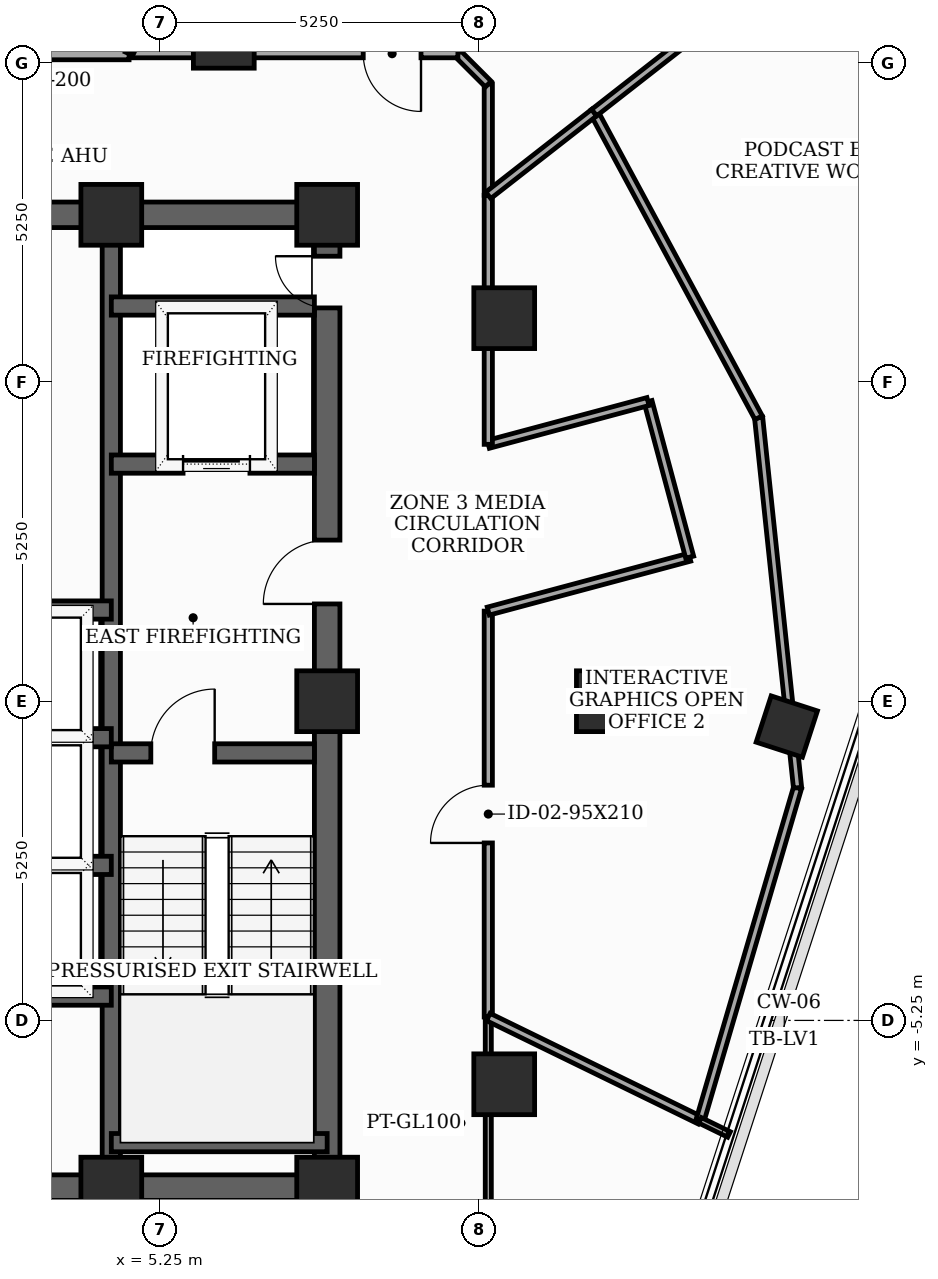
"""IFC4 building model, lengths in metres.
Left out: names, types, materials, properties, quantities, classifications, styles, units other than length and angle.
Written with IfcOpenShell. Run it as: python <this file> out.ifc"""

import sys

from ifc_helpers import new_model, si_unit, direction, frame, frame_2d, origin, origin_2d, place, context, subcontext, project, spatial, rectangle, extrude, element, fill, save


model = new_model("IFC4")
c1 = context("Model", 3, precision=1e-05, world=origin(), true_north=direction((0.0, 1.0)))
c2 = subcontext(c1, "Body", "Model", "MODEL_VIEW")
j1 = project(units=[si_unit("LENGTHUNIT", "METRE"), si_unit("PLANEANGLEUNIT", "RADIAN")], contexts=[c1])
p1 = place(None, origin())
s1 = spatial("IfcSite", under=j1, at=p1, CompositionType="ELEMENT")
p2 = place(p1, origin())
s2 = spatial("IfcBuilding", under=s1, at=p2, CompositionType="ELEMENT")
p3 = place(p2, frame((0.0, 0.0, 294.3)))
s3 = spatial("IfcBuildingStorey", under=s2, at=p3, CompositionType="ELEMENT", Elevation=294.3)
for number, where, z_axis, x_axis in (
    (1, (4.45, -8.0, 0.0), (0.0, 0.0, 1.0), (1.0, 0.0, 0.0)),
    (2, (8.0, -8.0, 0.0), (0.0, 0.0, 1.0), (1.0, 0.0, 0.0)),
    (3, (8.0, 0.0, 0.0), (0.0, 0.0, 1.0), (1.0, 0.0, 0.0)),
    (4, (8.0, 8.0, 0.0), (0.0, 0.0, 1.0), (1.0, 0.0, 0.0)),
    (5, (4.45, 8.0, 0.0), (0.0, 0.0, 1.0), (1.0, 0.0, 0.0)),
    (6, (12.6, 0.0, 0.0), (0.0, 0.0, 1.0), (1.0, 0.0, 0.0)),
    (7, (10.912, 6.3, 0.0), (0.0, 0.0, 1.0), (1.0, 0.0, 0.0)),
    (8, (6.3, 10.912, 0.0), (0.0, 0.0, 1.0), (1.0, 0.0, 0.0)),
    (9, (10.912, -6.3, 0.0), (0.0, 0.0, 1.0), (1.0, 0.0, 0.0)),
):
    element("IfcColumn", number, at=place(p3, frame(where, z_axis=z_axis, x_axis=x_axis)), inside=s3, PredefinedType="COLUMN", context=c2, shape_type="SweptSolid", body=[
        extrude(rectangle(XDim=1.0, YDim=1.0, at=origin_2d()), origin(), (0.0, 0.0, 1.0), 3.7),
    ])
p4 = place(p3, frame((15.559, -0.417, 0.0), z_axis=(0.0, 0.0, 1.0), x_axis=(0.309016994375, 0.951056516295, 0.0)))
e10 = element("IfcColumn", 10, at=p4, inside=s3, PredefinedType="COLUMN", context=c2, shape_type="SweptSolid", body=[
    extrude(rectangle(XDim=0.8, YDim=0.8, at=origin_2d()), origin(), (0.0, 0.0, 1.0), 3.7),
])
p5 = place(p3, frame((8.0, -8.0, 0.0), z_axis=(0.0, 0.0, 1.0), x_axis=(0.0, 1.0, 0.0)))
e11 = element("IfcWall", 11, at=p5, inside=s3, PredefinedType="SHEAR", context=c2, shape_type="SweptSolid", body=[
    extrude(rectangle(XDim=16.0, YDim=0.42, at=frame_2d((8.0, 0.0))), origin(), (0.0, 0.0, 1.0), 3.5),
])
p6 = place(p5, frame((9.6, 0.0, 0.0)))
e12 = element("IfcOpeningElement", 12, at=p6, cuts=e11, PredefinedType="OPENING", context=c2, shape_type="SweptSolid", body=[
    extrude(rectangle(XDim=1.05, YDim=2.15, at=frame_2d((0.525, 1.075))), frame((0.0, 0.22, 0.0), z_axis=(0.0, -1.0, 0.0), x_axis=(1.0, 0.0, 0.0)), (0.0, 0.0, 1.0), 0.44),
])
p7 = place(p5, frame((14.469, 0.0, 0.0)))
e13 = element("IfcOpeningElement", 13, at=p7, cuts=e11, PredefinedType="OPENING", context=c2, shape_type="SweptSolid", body=[
    extrude(rectangle(XDim=0.85, YDim=2.02, at=frame_2d((0.425, 1.01))), frame((0.0, 0.22, 0.0), z_axis=(0.0, -1.0, 0.0), x_axis=(1.0, 0.0, 0.0)), (0.0, 0.0, 1.0), 0.44),
])
p8 = place(p3, frame((-8.0, -8.0, 0.0), z_axis=(0.0, 0.0, 1.0), x_axis=(1.0, 0.0, 0.0)))
e14 = element("IfcWall", 14, at=p8, inside=s3, PredefinedType="SHEAR", context=c2, shape_type="SweptSolid", body=[
    extrude(rectangle(XDim=16.0, YDim=0.42, at=frame_2d((8.0, 0.0))), origin(), (0.0, 0.0, 1.0), 3.5),
])
p9 = place(p8, frame((5.2, 0.0, 0.0)))
e15 = element("IfcOpeningElement", 15, at=p9, cuts=e14, PredefinedType="OPENING", context=c2, shape_type="SweptSolid", body=[
    extrude(rectangle(XDim=0.95, YDim=2.1, at=frame_2d((0.475, 1.05))), frame((0.0, 0.22, 0.0), z_axis=(0.0, -1.0, 0.0), x_axis=(1.0, 0.0, 0.0)), (0.0, 0.0, 1.0), 0.44),
])
p10 = place(p8, frame((9.8, 0.0, 0.0)))
e16 = element("IfcOpeningElement", 16, at=p10, cuts=e14, PredefinedType="OPENING", context=c2, shape_type="SweptSolid", body=[
    extrude(rectangle(XDim=0.95, YDim=2.1, at=frame_2d((0.475, 1.05))), frame((0.0, 0.22, 0.0), z_axis=(0.0, -1.0, 0.0), x_axis=(1.0, 0.0, 0.0)), (0.0, 0.0, 1.0), 0.44),
])
p11 = place(p3, frame((-8.0, 8.0, 0.0), z_axis=(0.0, 0.0, 1.0), x_axis=(1.0, 0.0, 0.0)))
e17 = element("IfcWall", 17, at=p11, inside=s3, PredefinedType="SHEAR", context=c2, shape_type="SweptSolid", body=[
    extrude(rectangle(XDim=16.0, YDim=0.42, at=frame_2d((8.0, 0.0))), origin(), (0.0, 0.0, 1.0), 3.5),
])
p12 = place(p11, frame((7.1, 0.0, 0.0)))
e18 = element("IfcOpeningElement", 18, at=p12, cuts=e17, PredefinedType="OPENING", context=c2, shape_type="SweptSolid", body=[
    extrude(rectangle(XDim=1.8, YDim=2.15, at=frame_2d((0.9, 1.075))), frame((0.0, 0.22, 0.0), z_axis=(0.0, -1.0, 0.0), x_axis=(1.0, 0.0, 0.0)), (0.0, 0.0, 1.0), 0.44),
])
p13 = place(p3, frame((4.45, -7.79, 0.0), z_axis=(0.0, 0.0, 1.0), x_axis=(0.0, 1.0, 0.0)))
e19 = element("IfcWall", 19, at=p13, inside=s3, PredefinedType="SHEAR", context=c2, shape_type="SweptSolid", body=[
    extrude(rectangle(XDim=15.58, YDim=0.3, at=frame_2d((7.79, 0.0))), origin(), (0.0, 0.0, 1.0), 3.5),
])
p14 = place(p3, frame((4.45, -0.85, 0.0), z_axis=(0.0, 0.0, 1.0), x_axis=(1.0, 0.0, 0.0)))
e20 = element("IfcWall", 20, at=p14, inside=s3, PredefinedType="SHEAR", context=c2, shape_type="SweptSolid", body=[
    extrude(rectangle(XDim=3.34, YDim=0.3, at=frame_2d((1.67, 0.0))), origin(), (0.0, 0.0, 1.0), 3.5),
])
p15 = place(p14, frame((0.65, 0.0, 0.0)))
e21 = element("IfcOpeningElement", 21, at=p15, cuts=e20, PredefinedType="OPENING", context=c2, shape_type="SweptSolid", body=[
    extrude(rectangle(XDim=1.05, YDim=2.15, at=frame_2d((0.525, 1.075))), frame((0.0, 0.16, 0.0), z_axis=(0.0, -1.0, 0.0), x_axis=(1.0, 0.0, 0.0)), (0.0, 0.0, 1.0), 0.32),
])
p16 = place(p3, frame((4.45, -7.26, 0.0), z_axis=(0.0, 0.0, 1.0), x_axis=(1.0, 0.0, 0.0)))
e22 = element("IfcWall", 22, at=p16, inside=s3, PredefinedType="SHEAR", context=c2, shape_type="SweptSolid", body=[
    extrude(rectangle(XDim=3.55, YDim=0.3, at=frame_2d((1.775, 0.0))), origin(), (0.0, 0.0, 1.0), 3.5),
])
p17 = place(p3, frame((4.45, 3.9, 0.0), z_axis=(0.0, 0.0, 1.0), x_axis=(1.0, 0.0, 0.0)))
e23 = element("IfcWall", 23, at=p17, inside=s3, PredefinedType="SHEAR", context=c2, shape_type="SweptSolid", body=[
    extrude(rectangle(XDim=3.34, YDim=0.3, at=frame_2d((1.67, 0.0))), origin(), (0.0, 0.0, 1.0), 3.5),
])
p18 = place(p17, frame((1.18, 0.0, 0.0)))
e24 = element("IfcOpeningElement", 24, at=p18, cuts=e23, PredefinedType="OPENING", context=c2, shape_type="SweptSolid", body=[
    extrude(rectangle(XDim=1.1, YDim=2.1, at=frame_2d((0.55, 1.05))), frame((0.0, 0.16, 0.0), z_axis=(0.0, -1.0, 0.0), x_axis=(1.0, 0.0, 0.0)), (0.0, 0.0, 1.0), 0.32),
])
p19 = place(p3, frame((4.45, 6.5, 0.0), z_axis=(0.0, 0.0, 1.0), x_axis=(1.0, 0.0, 0.0)))
e25 = element("IfcWall", 25, at=p19, inside=s3, PredefinedType="SHEAR", context=c2, shape_type="SweptSolid", body=[
    extrude(rectangle(XDim=3.34, YDim=0.3, at=frame_2d((1.67, 0.0))), origin(), (0.0, 0.0, 1.0), 3.5),
])
p20 = place(p3, frame((-4.45, -4.85, 0.0), z_axis=(0.0, 0.0, 1.0), x_axis=(1.0, 0.0, 0.0)))
e26 = element("IfcWall", 26, at=p20, inside=s3, PredefinedType="SHEAR", context=c2, shape_type="SweptSolid", body=[
    extrude(rectangle(XDim=8.9, YDim=0.3, at=frame_2d((4.45, 0.0))), origin(), (0.0, 0.0, 1.0), 3.5),
])
for number, where, z_axis, x_axis in (
    (27, (1.68, 1.5, 0.0), (0.0, 0.0, 1.0), (1.0, 0.0, 0.0)),
    (28, (1.68, -2.7, 0.0), (0.0, 0.0, 1.0), (1.0, 0.0, 0.0)),
    (29, (1.68, -0.6, 0.0), (0.0, 0.0, 1.0), (1.0, 0.0, 0.0)),
):
    element("IfcWall", number, at=place(p3, frame(where, z_axis=z_axis, x_axis=x_axis)), inside=s3, PredefinedType="SHEAR", context=c2, shape_type="SweptSolid", body=[
        extrude(rectangle(XDim=2.77, YDim=0.3, at=frame_2d((1.385, 0.0))), origin(), (0.0, 0.0, 1.0), 3.5),
    ])
p21 = place(p3, frame((10.65, -5.194, 0.0), z_axis=(0.0, 0.0, 1.0), x_axis=(0.0, 1.0, 0.0)))
e30 = element("IfcWall", 30, at=p21, inside=s3, PredefinedType="PARTITIONING", context=c2, shape_type="SweptSolid", body=[
    extrude(rectangle(XDim=6.676, YDim=0.135, at=frame_2d((3.338, 0.0))), origin(), (0.0, 0.0, 1.0), 2.885),
])
p22 = place(p21, frame((2.863, 0.0, 0.0)))
e31 = element("IfcOpeningElement", 31, at=p22, cuts=e30, PredefinedType="OPENING", context=c2, shape_type="SweptSolid", body=[
    extrude(rectangle(XDim=0.95, YDim=2.1, at=frame_2d((0.475, 1.05))), frame((0.0, 0.077, 0.0), z_axis=(0.0, -1.0, 0.0), x_axis=(1.0, 0.0, 0.0)), (0.0, 0.0, 1.0), 0.155),
])
p23 = place(p3, frame((10.65, 1.482, 0.0), z_axis=(0.0, 0.0, 1.0), x_axis=(0.965961397105, 0.2586862565, 0.0)))
e32 = element("IfcWall", 32, at=p23, inside=s3, PredefinedType="PARTITIONING", context=c2, shape_type="SweptSolid", body=[
    extrude(rectangle(XDim=3.429, YDim=0.135, at=frame_2d((1.714, 0.0))), origin(), (0.0, 0.0, 1.0), 2.885),
])
p24 = place(p3, frame((13.962, 2.369, 0.0), z_axis=(0.0, 0.0, 1.0), x_axis=(-0.258413725385, 0.966034340245, 0.0)))
e33 = element("IfcWall", 33, at=p24, inside=s3, PredefinedType="PARTITIONING", context=c2, shape_type="SweptSolid", body=[
    extrude(rectangle(XDim=2.65, YDim=0.135, at=frame_2d((1.325, 0.0))), origin(), (0.0, 0.0, 1.0), 3.5),
])
p25 = place(p3, frame((13.277, 4.929, 0.0), z_axis=(0.0, 0.0, 1.0), x_axis=(-0.965934830229, -0.258785439601, 0.0)))
e34 = element("IfcWall", 34, at=p25, inside=s3, PredefinedType="PARTITIONING", context=c2, shape_type="SweptSolid", body=[
    extrude(rectangle(XDim=2.72, YDim=0.135, at=frame_2d((1.36, 0.0))), origin(), (0.0, 0.0, 1.0), 2.885),
])
p26 = place(p3, frame((10.65, 4.225, 0.0), z_axis=(0.0, 0.0, 1.0), x_axis=(0.0, 1.0, 0.0)))
e35 = element("IfcWall", 35, at=p26, inside=s3, PredefinedType="PARTITIONING", context=c2, shape_type="SweptSolid", body=[
    extrude(rectangle(XDim=4.096, YDim=0.135, at=frame_2d((2.048, 0.0))), origin(), (0.0, 0.0, 1.0), 2.885),
])
p27 = place(p3, frame((10.65, -10.15, 0.0), z_axis=(0.0, 0.0, 1.0), x_axis=(0.0, 1.0, 0.0)))
e36 = element("IfcWall", 36, at=p27, inside=s3, PredefinedType="MOVABLE", context=c2, shape_type="SweptSolid", body=[
    extrude(rectangle(XDim=4.956, YDim=0.1, at=frame_2d((2.478, 0.0))), origin(), (0.0, 0.0, 1.0), 2.885),
])
p28 = place(p27, frame((0.516, 0.0, 0.0)))
e37 = element("IfcOpeningElement", 37, at=p28, cuts=e36, PredefinedType="OPENING", context=c2, shape_type="SweptSolid", body=[
    extrude(rectangle(XDim=0.95, YDim=2.1, at=frame_2d((0.475, 1.05))), frame((0.0, 0.06, 0.0), z_axis=(0.0, -1.0, 0.0), x_axis=(1.0, 0.0, 0.0)), (0.0, 0.0, 1.0), 0.12),
])
p29 = place(p3, frame((10.65, 8.321, 0.0), z_axis=(0.0, 0.0, 1.0), x_axis=(0.0, 1.0, 0.0)))
e38 = element("IfcWall", 38, at=p29, inside=s3, PredefinedType="PARTITIONING", context=c2, shape_type="SweptSolid", body=[
    extrude(rectangle(XDim=1.829, YDim=0.135, at=frame_2d((0.915, 0.0))), origin(), (0.0, 0.0, 1.0), 3.5),
])
p30 = place(p3, frame((10.65, 10.15, 0.0), z_axis=(0.0, 0.0, 1.0), x_axis=(-0.707106781187, 0.707106781187, 0.0)))
e39 = element("IfcWall", 39, at=p30, inside=s3, PredefinedType="PARTITIONING", context=c2, shape_type="SweptSolid", body=[
    extrude(rectangle(XDim=0.707, YDim=0.135, at=frame_2d((0.354, 0.0))), origin(), (0.0, 0.0, 1.0), 3.5),
])
p31 = place(p3, frame((10.15, 10.65, 0.0), z_axis=(0.0, 0.0, 1.0), x_axis=(-1.0, 0.0, 0.0)))
e40 = element("IfcWall", 40, at=p31, inside=s3, PredefinedType="PARTITIONING", context=c2, shape_type="SweptSolid", body=[
    extrude(rectangle(XDim=5.408, YDim=0.135, at=frame_2d((2.704, 0.0))), origin(), (0.0, 0.0, 1.0), 2.885),
])
p32 = place(p31, frame((0.607, 0.0, 0.0)))
e41 = element("IfcOpeningElement", 41, at=p32, cuts=e40, PredefinedType="OPENING", context=c2, shape_type="SweptSolid", body=[
    extrude(rectangle(XDim=0.95, YDim=2.1, at=frame_2d((0.475, 1.05))), frame((0.0, 0.077, 0.0), z_axis=(0.0, -1.0, 0.0), x_axis=(1.0, 0.0, 0.0)), (0.0, 0.0, 1.0), 0.155),
])
p33 = place(p3, frame((4.742, 10.65, 0.0), z_axis=(0.0, 0.0, 1.0), x_axis=(-1.0, 0.0, 0.0)))
e42 = element("IfcWall", 42, at=p33, inside=s3, PredefinedType="SOLIDWALL", context=c2, shape_type="SweptSolid", body=[
    extrude(rectangle(XDim=5.892, YDim=0.2, at=frame_2d((2.946, 0.0))), origin(), (0.0, 0.0, 1.0), 2.885),
])
p34 = place(p33, frame((2.471, 0.0, 0.0)))
e43 = element("IfcOpeningElement", 43, at=p34, cuts=e42, PredefinedType="OPENING", context=c2, shape_type="SweptSolid", body=[
    extrude(rectangle(XDim=0.95, YDim=2.1, at=frame_2d((0.475, 1.05))), frame((0.0, 0.11, 0.0), z_axis=(0.0, -1.0, 0.0), x_axis=(1.0, 0.0, 0.0)), (0.0, 0.0, 1.0), 0.22),
])
p35 = place(p3, frame((10.65, -5.194, 0.0), z_axis=(0.0, 0.0, 1.0), x_axis=(0.898781159743, -0.438397567159, 0.0)))
e44 = element("IfcWall", 44, at=p35, inside=s3, PredefinedType="PARTITIONING", context=c2, shape_type="SweptSolid", body=[
    extrude(rectangle(XDim=3.875, YDim=0.135, at=frame_2d((1.938, 0.0))), origin(), (0.0, 0.0, 1.0), 2.885),
])
p36 = place(p3, frame((14.133, -6.893, 0.0), z_axis=(0.0, 0.0, 1.0), x_axis=(0.281231672123, 0.959639904649, 0.0)))
e45 = element("IfcWall", 45, at=p36, inside=s3, PredefinedType="PARTITIONING", context=c2, shape_type="SweptSolid", body=[
    extrude(rectangle(XDim=5.7, YDim=0.135, at=frame_2d((2.85, 0.0))), origin(), (0.0, 0.0, 1.0), 3.5),
])
p37 = place(p3, frame((15.736, -1.423, 0.0), z_axis=(0.0, 0.0, 1.0), x_axis=(-0.104601717472, 0.994514193313, 0.0)))
e46 = element("IfcWall", 46, at=p37, inside=s3, PredefinedType="PARTITIONING", context=c2, shape_type="SweptSolid", body=[
    extrude(rectangle(XDim=6.12, YDim=0.135, at=frame_2d((3.06, 0.0))), origin(), (0.0, 0.0, 1.0), 3.035),
])
p38 = place(p3, frame((15.096, 4.663, 0.0), z_axis=(0.0, 0.0, 1.0), x_axis=(-0.474498198469, 0.88025647379, 0.0)))
e47 = element("IfcWall", 47, at=p38, inside=s3, PredefinedType="PARTITIONING", context=c2, shape_type="SweptSolid", body=[
    extrude(rectangle(XDim=5.7, YDim=0.135, at=frame_2d((2.85, 0.0))), origin(), (0.0, 0.0, 1.0), 3.035),
])
p39 = place(p3, frame((12.391, 9.681, 0.0), z_axis=(0.0, 0.0, 1.0), x_axis=(-0.788124883644, -0.615515367624, 0.0)))
e48 = element("IfcWall", 48, at=p39, inside=s3, PredefinedType="PARTITIONING", context=c2, shape_type="SweptSolid", body=[
    extrude(rectangle(XDim=2.209, YDim=0.135, at=frame_2d((1.104, 0.0))), origin(), (0.0, 0.0, 1.0), 3.5),
])
p40 = place(p3, frame((14.609, -7.126, 0.0), z_axis=(0.0, 0.0, 1.0), x_axis=(-0.898533726223, 0.438904480313, 0.0)))
e49 = element("IfcWall", 49, at=p40, inside=s3, PredefinedType="MOVABLE", context=c2, shape_type="SweptSolid", body=[
    extrude(rectangle(XDim=0.53, YDim=0.1, at=frame_2d((0.265, 0.0))), origin(), (0.0, 0.0, 1.0), 3.5),
])
p41 = place(p3, frame((22.192, 17.338, 0.0), z_axis=(0.0, 0.0, 1.0), x_axis=(-0.788015446076, -0.615655469192, 0.0)))
e50 = element("IfcWall", 50, at=p41, inside=s3, PredefinedType="PARTITIONING", context=c2, shape_type="SweptSolid", body=[
    extrude(rectangle(XDim=12.438, YDim=0.135, at=frame_2d((6.219, 0.0))), origin(), (0.0, 0.0, 1.0), 3.035),
])
p42 = place(p41, frame((5.759, 0.0, 0.0)))
e51 = element("IfcOpeningElement", 51, at=p42, cuts=e50, PredefinedType="OPENING", context=c2, shape_type="SweptSolid", body=[
    extrude(rectangle(XDim=0.92, YDim=2.1, at=frame_2d((0.46, 1.05))), frame((0.0, 0.077, 0.0), z_axis=(0.0, -1.0, 0.0), x_axis=(1.0, 0.0, 0.0)), (0.0, 0.0, 1.0), 0.155),
])
p43 = place(p3, frame((6.397, 14.368, 0.0), z_axis=(0.0, 0.0, 1.0), x_axis=(-0.406667169341, -0.913576386177, 0.0)))
e52 = element("IfcWall", 52, at=p43, inside=s3, PredefinedType="PARTITIONING", context=c2, shape_type="SweptSolid", body=[
    extrude(rectangle(XDim=4.07, YDim=0.135, at=frame_2d((2.035, 0.0))), origin(), (0.0, 0.0, 1.0), 2.885),
])
p44 = place(p6, origin())
e53 = element("IfcDoor", 53, at=p44, inside=s3, OperationType="SINGLE_SWING_LEFT", PredefinedType="DOOR", context=c2, shape_type="SweptSolid", body=[
    extrude(rectangle(XDim=1.05, YDim=2.15, at=frame_2d((0.525, 1.075))), frame((0.0, 0.025, 0.0), z_axis=(0.0, -1.0, 0.0), x_axis=(1.0, 0.0, 0.0)), (0.0, 0.0, 1.0), 0.05),
])
fill(e12, e53)
p45 = place(p7, origin())
e54 = element("IfcDoor", 54, at=p45, inside=s3, OperationType="SINGLE_SWING_RIGHT", PredefinedType="TRAPDOOR", context=c2, shape_type="SweptSolid", body=[
    extrude(rectangle(XDim=0.85, YDim=2.02, at=frame_2d((0.425, 1.01))), frame((0.0, 0.025, 0.0), z_axis=(0.0, -1.0, 0.0), x_axis=(1.0, 0.0, 0.0)), (0.0, 0.0, 1.0), 0.05),
])
fill(e13, e54)
p46 = place(p15, origin())
e55 = element("IfcDoor", 55, at=p46, inside=s3, OperationType="SINGLE_SWING_RIGHT", PredefinedType="DOOR", context=c2, shape_type="SweptSolid", body=[
    extrude(rectangle(XDim=1.05, YDim=2.15, at=frame_2d((0.525, 1.075))), frame((0.0, 0.025, 0.0), z_axis=(0.0, -1.0, 0.0), x_axis=(1.0, 0.0, 0.0)), (0.0, 0.0, 1.0), 0.05),
])
fill(e21, e55)
p47 = place(p18, origin())
e56 = element("IfcDoor", 56, at=p47, inside=s3, OperationType="SLIDING_TO_LEFT", PredefinedType="DOOR", context=c2, shape_type="SweptSolid", body=[
    extrude(rectangle(XDim=1.1, YDim=2.1, at=frame_2d((0.55, 1.05))), frame((0.0, 0.025, 0.0), z_axis=(0.0, -1.0, 0.0), x_axis=(1.0, 0.0, 0.0)), (0.0, 0.0, 1.0), 0.05),
])
fill(e24, e56)
p48 = place(p22, origin())
e57 = element("IfcDoor", 57, at=p48, inside=s3, OperationType="SINGLE_SWING_LEFT", PredefinedType="DOOR", context=c2, shape_type="SweptSolid", body=[
    extrude(rectangle(XDim=0.95, YDim=2.1, at=frame_2d((0.475, 1.05))), frame((0.0, 0.025, 0.0), z_axis=(0.0, -1.0, 0.0), x_axis=(1.0, 0.0, 0.0)), (0.0, 0.0, 1.0), 0.05),
])
fill(e31, e57)
p49 = place(p32, origin())
e58 = element("IfcDoor", 58, at=p49, inside=s3, OperationType="SINGLE_SWING_LEFT", PredefinedType="DOOR", context=c2, shape_type="SweptSolid", body=[
    extrude(rectangle(XDim=0.95, YDim=2.1, at=frame_2d((0.475, 1.05))), frame((0.0, 0.025, 0.0), z_axis=(0.0, -1.0, 0.0), x_axis=(1.0, 0.0, 0.0)), (0.0, 0.0, 1.0), 0.05),
])
fill(e41, e58)
save(model, sys.argv[1])
